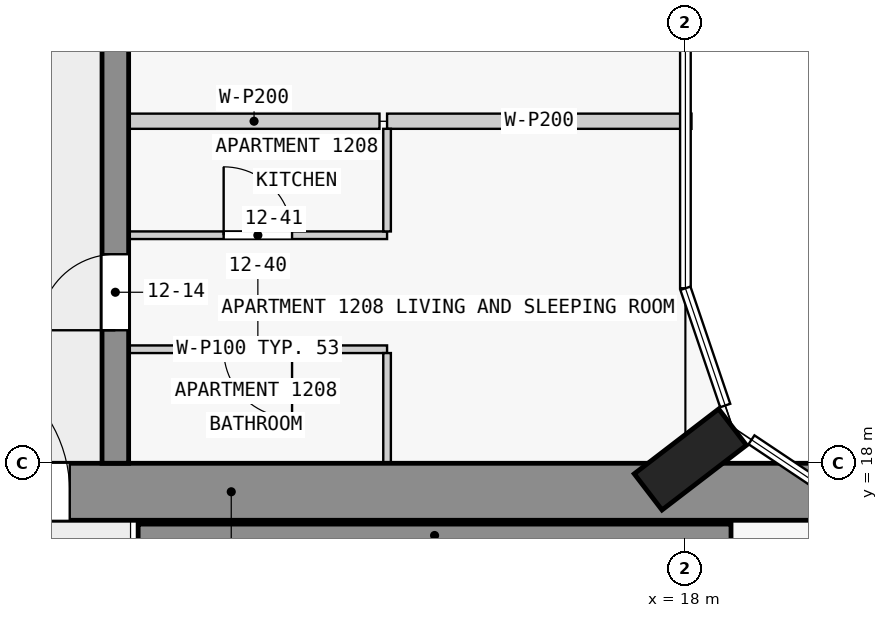
"""IFC4 building model, lengths in metres.
Left out: names, types, materials, properties, quantities, classifications, styles, units other than length and angle.
Written with IfcOpenShell. Run it as: python <this file> out.ifc"""

import sys

from ifc_helpers import new_model, si_unit, direction, frame, frame_2d, origin, origin_2d, place, context, subcontext, project, spatial, rectangle, extrude, element, fill, save


model = new_model("IFC4")
c1 = context("Model", 3, precision=1e-05, world=origin(), true_north=direction((0.0, 1.0)))
c2 = subcontext(c1, "Body", "Model", "MODEL_VIEW")
j1 = project(units=[si_unit("LENGTHUNIT", "METRE"), si_unit("PLANEANGLEUNIT", "RADIAN")], contexts=[c1])
p1 = place(None, origin())
s1 = spatial("IfcSite", under=j1, at=p1, CompositionType="ELEMENT")
p2 = place(p1, origin())
s2 = spatial("IfcBuilding", under=s1, at=p2, CompositionType="ELEMENT")
p3 = place(p2, frame((0.0, 0.0, 51.3)))
s3 = spatial("IfcBuildingStorey", under=s2, at=p3, CompositionType="ELEMENT", Elevation=51.3)
p4 = place(p3, frame((18.065, 18.05, 0.0), z_axis=(0.0, 0.0, 1.0), x_axis=(-0.608810846443, 0.793315418515, 0.0)))
e1 = element("IfcColumn", 1, at=p4, inside=s3, PredefinedType="COLUMN", context=c2, shape_type="SweptSolid", body=[
    extrude(rectangle(XDim=0.6, YDim=1.4, at=origin_2d()), origin(), (0.0, 0.0, 1.0), 3.5),
])
p5 = place(p3, frame((1.55, 17.625, 0.0), z_axis=(0.0, 0.0, 1.0), x_axis=(1.0, 0.0, 0.0)))
e2 = element("IfcWall", 2, at=p5, inside=s3, PredefinedType="SHEAR", context=c2, shape_type="SweptSolid", body=[
    extrude(rectangle(XDim=20.95, YDim=0.75, at=frame_2d((10.475, 0.0))), origin(), (0.0, 0.0, 1.0), 3.25),
])
p6 = place(p5, frame((6.55, 0.0, 0.0)))
e3 = element("IfcOpeningElement", 3, at=p6, cuts=e2, PredefinedType="OPENING", context=c2, shape_type="SweptSolid", body=[
    extrude(rectangle(XDim=1.8, YDim=2.1, at=frame_2d((0.9, 1.05))), frame((0.0, 0.385, 0.0), z_axis=(0.0, -1.0, 0.0), x_axis=(1.0, 0.0, 0.0)), (0.0, 0.0, 1.0), 0.77),
])
p7 = place(p3, frame((10.8, 17.05, 0.0), z_axis=(0.0, 0.0, 1.0), x_axis=(1.0, 0.0, 0.0)))
e4 = element("IfcWall", 4, at=p7, inside=s3, PredefinedType="SHEAR", context=c2, shape_type="SweptSolid", body=[
    extrude(rectangle(XDim=7.8, YDim=0.3, at=frame_2d((3.9, 0.0))), origin(), (0.0, 0.0, 1.0), 3.25),
])
p8 = place(p3, frame((10.5, 18.0, 0.0), z_axis=(0.0, 0.0, 1.0), x_axis=(0.0, 1.0, 0.0)))
e5 = element("IfcWall", 5, at=p8, inside=s3, PredefinedType="SHEAR", context=c2, shape_type="SweptSolid", body=[
    extrude(rectangle(XDim=27.0, YDim=0.35, at=frame_2d((13.5, 0.0))), origin(), (0.0, 0.0, 1.0), 3.25),
])
p9 = place(p8, frame((1.75, 0.0, 0.0)))
e6 = element("IfcOpeningElement", 6, at=p9, cuts=e5, PredefinedType="OPENING", context=c2, shape_type="SweptSolid", body=[
    extrude(rectangle(XDim=1.0, YDim=2.1, at=frame_2d((0.5, 1.05))), frame((0.0, 0.185, 0.0), z_axis=(0.0, -1.0, 0.0), x_axis=(1.0, 0.0, 0.0)), (0.0, 0.0, 1.0), 0.37),
])
p10 = place(p8, frame((6.25, 0.0, 0.0)))
e7 = element("IfcOpeningElement", 7, at=p10, cuts=e5, PredefinedType="OPENING", context=c2, shape_type="SweptSolid", body=[
    extrude(rectangle(XDim=1.0, YDim=2.1, at=frame_2d((0.5, 1.05))), frame((0.0, 0.185, 0.0), z_axis=(0.0, -1.0, 0.0), x_axis=(1.0, 0.0, 0.0)), (0.0, 0.0, 1.0), 0.37),
])
p11 = place(p8, frame((10.75, 0.0, 0.0)))
e8 = element("IfcOpeningElement", 8, at=p11, cuts=e5, PredefinedType="OPENING", context=c2, shape_type="SweptSolid", body=[
    extrude(rectangle(XDim=1.0, YDim=2.1, at=frame_2d((0.5, 1.05))), frame((0.0, 0.185, 0.0), z_axis=(0.0, -1.0, 0.0), x_axis=(1.0, 0.0, 0.0)), (0.0, 0.0, 1.0), 0.37),
])
p12 = place(p8, frame((15.25, 0.0, 0.0)))
e9 = element("IfcOpeningElement", 9, at=p12, cuts=e5, PredefinedType="OPENING", context=c2, shape_type="SweptSolid", body=[
    extrude(rectangle(XDim=1.0, YDim=2.1, at=frame_2d((0.5, 1.05))), frame((0.0, 0.185, 0.0), z_axis=(0.0, -1.0, 0.0), x_axis=(1.0, 0.0, 0.0)), (0.0, 0.0, 1.0), 0.37),
])
p13 = place(p8, frame((21.35, 0.0, 0.0)))
e10 = element("IfcOpeningElement", 10, at=p13, cuts=e5, PredefinedType="OPENING", context=c2, shape_type="SweptSolid", body=[
    extrude(rectangle(XDim=1.0, YDim=2.1, at=frame_2d((0.5, 1.05))), frame((0.0, 0.185, 0.0), z_axis=(0.0, -1.0, 0.0), x_axis=(1.0, 0.0, 0.0)), (0.0, 0.0, 1.0), 0.37),
])
p14 = place(p3, frame((14.075, 19.5, 0.0), z_axis=(0.0, 0.0, 1.0), x_axis=(-1.0, 0.0, 0.0)))
e11 = element("IfcWall", 11, at=p14, inside=s3, PredefinedType="PARTITIONING", context=c2, shape_type="SweptSolid", body=[
    extrude(rectangle(XDim=3.4, YDim=0.1, at=frame_2d((1.7, 0.0))), origin(), (0.0, 0.0, 1.0), 3.25),
])
p15 = place(p14, frame((1.25, 0.0, 0.0)))
e12 = element("IfcOpeningElement", 12, at=p15, cuts=e11, PredefinedType="OPENING", context=c2, shape_type="SweptSolid", body=[
    extrude(rectangle(XDim=0.9, YDim=2.1, at=frame_2d((0.45, 1.05))), frame((0.0, 0.06, 0.0), z_axis=(0.0, -1.0, 0.0), x_axis=(1.0, 0.0, 0.0)), (0.0, 0.0, 1.0), 0.12),
])
p16 = place(p3, frame((10.675, 21.0, 0.0), z_axis=(0.0, 0.0, 1.0), x_axis=(1.0, 0.0, 0.0)))
e13 = element("IfcWall", 13, at=p16, inside=s3, PredefinedType="PARTITIONING", context=c2, shape_type="SweptSolid", body=[
    extrude(rectangle(XDim=3.4, YDim=0.1, at=frame_2d((1.7, 0.0))), origin(), (0.0, 0.0, 1.0), 3.25),
])
p17 = place(p16, frame((1.25, 0.0, 0.0)))
e14 = element("IfcOpeningElement", 14, at=p17, cuts=e13, PredefinedType="OPENING", context=c2, shape_type="SweptSolid", body=[
    extrude(rectangle(XDim=0.9, YDim=2.1, at=frame_2d((0.45, 1.05))), frame((0.0, 0.06, 0.0), z_axis=(0.0, -1.0, 0.0), x_axis=(1.0, 0.0, 0.0)), (0.0, 0.0, 1.0), 0.12),
])
p18 = place(p3, frame((13.975, 22.5, 0.0), z_axis=(0.0, 0.0, 1.0), x_axis=(-1.0, 0.0, 0.0)))
e15 = element("IfcWall", 15, at=p18, inside=s3, PredefinedType="PARTITIONING", context=c2, shape_type="SweptSolid", body=[
    extrude(rectangle(XDim=3.3, YDim=0.2, at=frame_2d((1.65, 0.0))), origin(), (0.0, 0.0, 1.0), 3.25),
])
p19 = place(p3, frame((14.075, 22.5, 0.0), z_axis=(0.0, 0.0, 1.0), x_axis=(1.0, 0.0, 0.0)))
e16 = element("IfcWall", 16, at=p19, inside=s3, PredefinedType="PARTITIONING", context=c2, shape_type="SweptSolid", body=[
    extrude(rectangle(XDim=4.005, YDim=0.2, at=frame_2d((2.002, 0.0))), origin(), (0.0, 0.0, 1.0), 3.25),
])
p20 = place(p3, frame((14.075, 18.0, 0.0), z_axis=(0.0, 0.0, 1.0), x_axis=(0.0, 1.0, 0.0)))
e17 = element("IfcWall", 17, at=p20, inside=s3, PredefinedType="PARTITIONING", context=c2, shape_type="SweptSolid", body=[
    extrude(rectangle(XDim=1.45, YDim=0.1, at=frame_2d((0.725, 0.0))), origin(), (0.0, 0.0, 1.0), 3.25),
])
p21 = place(p3, frame((14.075, 21.05, 0.0), z_axis=(0.0, 0.0, 1.0), x_axis=(0.0, 1.0, 0.0)))
e18 = element("IfcWall", 18, at=p21, inside=s3, PredefinedType="PARTITIONING", context=c2, shape_type="SweptSolid", body=[
    extrude(rectangle(XDim=1.35, YDim=0.1, at=frame_2d((0.675, 0.0))), origin(), (0.0, 0.0, 1.0), 3.25),
])
p22 = place(p6, origin())
e19 = element("IfcDoor", 19, at=p22, inside=s3, OperationType="DOUBLE_DOOR_SINGLE_SWING", PredefinedType="DOOR", context=c2, shape_type="SweptSolid", body=[
    extrude(rectangle(XDim=1.8, YDim=2.1, at=frame_2d((0.9, 1.05))), frame((0.0, 0.025, 0.0), z_axis=(0.0, -1.0, 0.0), x_axis=(1.0, 0.0, 0.0)), (0.0, 0.0, 1.0), 0.05),
])
fill(e3, e19)
p23 = place(p9, origin())
e20 = element("IfcDoor", 20, at=p23, inside=s3, OperationType="SINGLE_SWING_LEFT", PredefinedType="DOOR", context=c2, shape_type="SweptSolid", body=[
    extrude(rectangle(XDim=1.0, YDim=2.1, at=frame_2d((0.5, 1.05))), frame((0.0, 0.025, 0.0), z_axis=(0.0, -1.0, 0.0), x_axis=(1.0, 0.0, 0.0)), (0.0, 0.0, 1.0), 0.05),
])
fill(e6, e20)
p24 = place(p15, origin())
e21 = element("IfcDoor", 21, at=p24, inside=s3, OperationType="SINGLE_SWING_RIGHT", PredefinedType="DOOR", context=c2, shape_type="SweptSolid", body=[
    extrude(rectangle(XDim=0.9, YDim=2.1, at=frame_2d((0.45, 1.05))), frame((0.0, 0.025, 0.0), z_axis=(0.0, -1.0, 0.0), x_axis=(1.0, 0.0, 0.0)), (0.0, 0.0, 1.0), 0.05),
])
fill(e12, e21)
p25 = place(p17, origin())
e22 = element("IfcDoor", 22, at=p25, inside=s3, OperationType="SINGLE_SWING_RIGHT", PredefinedType="DOOR", context=c2, shape_type="SweptSolid", body=[
    extrude(rectangle(XDim=0.9, YDim=2.1, at=frame_2d((0.45, 1.05))), frame((0.0, 0.025, 0.0), z_axis=(0.0, -1.0, 0.0), x_axis=(1.0, 0.0, 0.0)), (0.0, 0.0, 1.0), 0.05),
])
fill(e14, e22)
save(model, sys.argv[1])
